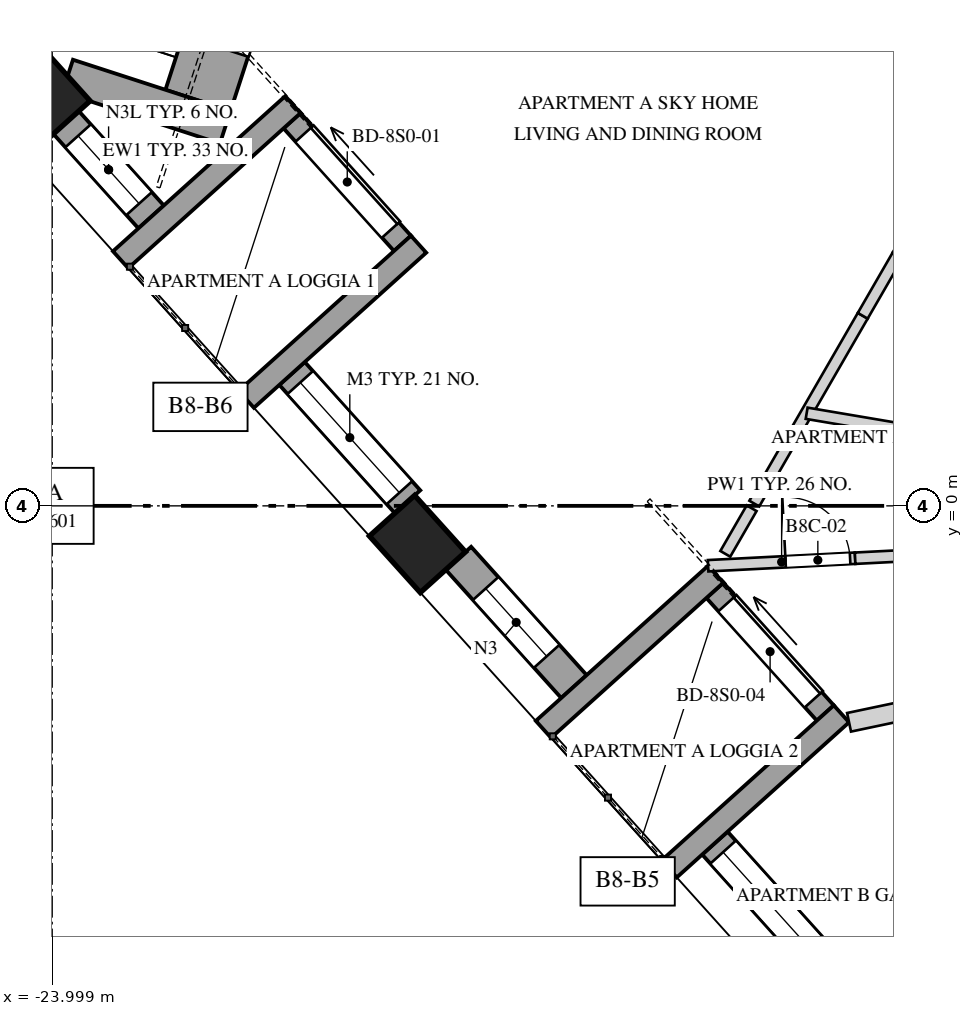
"""IFC4 building model, lengths in metres.
Left out: names, types, materials, properties, quantities, classifications, styles, units other than length and angle.
Written with IfcOpenShell. Run it as: python <this file> out.ifc"""

import sys

from ifc_helpers import new_model, si_unit, direction, frame, frame_2d, origin, origin_2d, place, context, subcontext, project, spatial, rectangle, extrude, element, fill, save


model = new_model("IFC4")
c1 = context("Model", 3, precision=1e-05, world=origin(), true_north=direction((0.0, 1.0)))
c2 = subcontext(c1, "Body", "Model", "MODEL_VIEW")
j1 = project(units=[si_unit("LENGTHUNIT", "METRE"), si_unit("PLANEANGLEUNIT", "RADIAN")], contexts=[c1])
p1 = place(None, origin())
s1 = spatial("IfcSite", under=j1, at=p1, CompositionType="ELEMENT")
p2 = place(p1, origin())
s2 = spatial("IfcBuilding", under=s1, at=p2, CompositionType="ELEMENT")
p3 = place(p2, frame((0.0, 0.0, 344.4)))
s3 = spatial("IfcBuildingStorey", under=s2, at=p3, CompositionType="ELEMENT", Elevation=344.4)
p4 = place(p3, frame((-24.278, 5.368, 0.0), z_axis=(0.0, 0.0, 1.0), x_axis=(0.669130606359, -0.743144825477, 0.0)))
e1 = element("IfcColumn", 1, at=p4, inside=s3, PredefinedType="COLUMN", context=c2, shape_type="SweptSolid", body=[
    extrude(rectangle(XDim=1.1, YDim=1.1, at=origin_2d()), origin(), (0.0, 0.0, 1.0), 4.0),
])
p5 = place(p3, frame((-19.195, -0.502, 0.0), z_axis=(0.0, 0.0, 1.0), x_axis=(0.669130606359, -0.743144825477, 0.0)))
e2 = element("IfcColumn", 2, at=p5, inside=s3, PredefinedType="COLUMN", context=c2, shape_type="SweptSolid", body=[
    extrude(rectangle(XDim=1.0, YDim=0.8, at=origin_2d()), origin(), (0.0, 0.0, 1.0), 4.0),
])
p6 = place(p3, frame((-23.817, 5.043, 0.0), z_axis=(0.0, 0.0, 1.0), x_axis=(0.669182609054, -0.743097998746, 0.0)))
e3 = element("IfcWall", 3, at=p6, inside=s3, PredefinedType="SOLIDWALL", context=c2, shape_type="SweptSolid", body=[
    extrude(rectangle(XDim=1.671, YDim=0.45, at=frame_2d((0.836, 0.0))), origin(), (0.0, 0.0, 1.0), 3.3),
])
p7 = place(p6, frame((0.236, 0.0, 0.4)))
e4 = element("IfcOpeningElement", 4, at=p7, cuts=e3, PredefinedType="OPENING", context=c2, shape_type="SweptSolid", body=[
    extrude(rectangle(XDim=1.2, YDim=2.1, at=frame_2d((0.6, 1.05))), frame((0.0, 0.235, 0.0), z_axis=(0.0, -1.0, 0.0), x_axis=(1.0, 0.0, 0.0)), (0.0, 0.0, 1.0), 0.47),
])
p8 = place(p3, frame((-20.844, 1.742, 0.0), z_axis=(0.0, 0.0, 1.0), x_axis=(0.669160694992, -0.743117732447, 0.0)))
e5 = element("IfcWall", 5, at=p8, inside=s3, PredefinedType="SOLIDWALL", context=c2, shape_type="SweptSolid", body=[
    extrude(rectangle(XDim=2.271, YDim=0.45, at=frame_2d((1.136, 0.0))), origin(), (0.0, 0.0, 1.0), 3.3),
])
p9 = place(p8, frame((0.161, 0.0, 0.4)))
e6 = element("IfcOpeningElement", 6, at=p9, cuts=e5, PredefinedType="OPENING", context=c2, shape_type="SweptSolid", body=[
    extrude(rectangle(XDim=1.95, YDim=2.75, at=frame_2d((0.975, 1.375))), frame((0.0, 0.235, 0.0), z_axis=(0.0, -1.0, 0.0), x_axis=(1.0, 0.0, 0.0)), (0.0, 0.0, 1.0), 0.47),
])
p10 = place(p3, frame((-18.656, -0.689, 0.0), z_axis=(0.0, 0.0, 1.0), x_axis=(0.669107243666, -0.743165860676, 0.0)))
e7 = element("IfcWall", 7, at=p10, inside=s3, PredefinedType="SOLIDWALL", context=c2, shape_type="SweptSolid", body=[
    extrude(rectangle(XDim=2.271, YDim=0.45, at=frame_2d((1.136, 0.0))), origin(), (0.0, 0.0, 1.0), 3.3),
])
p11 = place(p10, frame((0.536, 0.0, 0.4)))
e8 = element("IfcOpeningElement", 8, at=p11, cuts=e7, PredefinedType="OPENING", context=c2, shape_type="SweptSolid", body=[
    extrude(rectangle(XDim=1.2, YDim=2.75, at=frame_2d((0.6, 1.375))), frame((0.0, 0.235, 0.0), z_axis=(0.0, -1.0, 0.0), x_axis=(1.0, 0.0, 0.0)), (0.0, 0.0, 1.0), 0.47),
])
p12 = place(p3, frame((-15.281, -4.437, 0.0), z_axis=(0.0, 0.0, 1.0), x_axis=(0.669107243666, -0.743165860676, 0.0)))
e9 = element("IfcWall", 9, at=p12, inside=s3, PredefinedType="SOLIDWALL", context=c2, shape_type="SweptSolid", body=[
    extrude(rectangle(XDim=2.271, YDim=0.45, at=frame_2d((1.136, 0.0))), origin(), (0.0, 0.0, 1.0), 3.3),
])
p13 = place(p12, frame((0.161, 0.0, 0.4)))
e10 = element("IfcOpeningElement", 10, at=p13, cuts=e9, PredefinedType="OPENING", context=c2, shape_type="SweptSolid", body=[
    extrude(rectangle(XDim=1.95, YDim=2.75, at=frame_2d((0.975, 1.375))), frame((0.0, 0.235, 0.0), z_axis=(0.0, -1.0, 0.0), x_axis=(1.0, 0.0, 0.0)), (0.0, 0.0, 1.0), 0.47),
])
p14 = place(p3, frame((-20.844, 5.067, 0.0), z_axis=(0.0, 0.0, 1.0), x_axis=(0.669144868344, -0.743131983681, 0.0)))
e11 = element("IfcWall", 11, at=p14, inside=s3, PredefinedType="SOLIDWALL", context=c2, shape_type="SweptSolid", body=[
    extrude(rectangle(XDim=2.171, YDim=0.3, at=frame_2d((1.085, 0.0))), origin(), (0.0, 0.0, 1.0), 3.3),
])
p15 = place(p14, frame((0.236, 0.0, 0.0)))
e12 = element("IfcOpeningElement", 12, at=p15, cuts=e11, PredefinedType="OPENING", context=c2, shape_type="SweptSolid", body=[
    extrude(rectangle(XDim=1.7, YDim=2.5, at=frame_2d((0.85, 1.25))), frame((0.0, 0.16, 0.0), z_axis=(0.0, -1.0, 0.0), x_axis=(1.0, 0.0, 0.0)), (0.0, 0.0, 1.0), 0.32),
])
for number, where, z_axis, x_axis in (
    (13, (-23.1, 3.238, 0.0), (0.0, 0.0, 1.0), (0.743, 0.669, 0.0)),
    (14, (-21.447, 1.402, 0.0), (0.0, 0.0, 1.0), (0.743, 0.669, 0.0)),
):
    element("IfcWall", number, at=place(p3, frame(where, z_axis=z_axis, x_axis=x_axis)), inside=s3, PredefinedType="SOLIDWALL", context=c2, shape_type="SweptSolid", body=[
        extrude(rectangle(XDim=3.05, YDim=0.3, at=frame_2d((1.525, 0.0))), origin(), (0.0, 0.0, 1.0), 3.3),
    ])
p16 = place(p3, frame((-15.281, -1.111, 0.0), z_axis=(0.0, 0.0, 1.0), x_axis=(0.669144868344, -0.743131983681, 0.0)))
e15 = element("IfcWall", 15, at=p16, inside=s3, PredefinedType="SOLIDWALL", context=c2, shape_type="SweptSolid", body=[
    extrude(rectangle(XDim=2.171, YDim=0.3, at=frame_2d((1.085, 0.0))), origin(), (0.0, 0.0, 1.0), 3.3),
])
p17 = place(p16, frame((0.236, 0.0, 0.0)))
e16 = element("IfcOpeningElement", 16, at=p17, cuts=e15, PredefinedType="OPENING", context=c2, shape_type="SweptSolid", body=[
    extrude(rectangle(XDim=1.7, YDim=2.5, at=frame_2d((0.85, 1.25))), frame((0.0, 0.16, 0.0), z_axis=(0.0, -1.0, 0.0), x_axis=(1.0, 0.0, 0.0)), (0.0, 0.0, 1.0), 0.32),
])
p18 = place(p3, frame((-17.537, -2.94, 0.0), z_axis=(0.0, 0.0, 1.0), x_axis=(0.743118999127, 0.669159288314, 0.0)))
e17 = element("IfcWall", 17, at=p18, inside=s3, PredefinedType="SOLIDWALL", context=c2, shape_type="SweptSolid", body=[
    extrude(rectangle(XDim=3.05, YDim=0.3, at=frame_2d((1.525, 0.0))), origin(), (0.0, 0.0, 1.0), 3.3),
])
p19 = place(p3, frame((-15.883, -4.777, 0.0), z_axis=(0.0, 0.0, 1.0), x_axis=(0.743122960955, 0.669154888573, 0.0)))
e18 = element("IfcWall", 18, at=p19, inside=s3, PredefinedType="SOLIDWALL", context=c2, shape_type="SweptSolid", body=[
    extrude(rectangle(XDim=3.05, YDim=0.3, at=frame_2d((1.525, 0.0))), origin(), (0.0, 0.0, 1.0), 3.3),
])
p20 = place(p3, frame((-22.082, 5.335, 0.0), z_axis=(0.0, 0.0, 1.0), x_axis=(0.309019824916, 0.951055596592, 0.0)))
e19 = element("IfcWall", 19, at=p20, inside=s3, PredefinedType="SOLIDWALL", context=c2, shape_type="SweptSolid", body=[
    extrude(rectangle(XDim=3.5, YDim=0.9, at=frame_2d((1.75, 0.0))), origin(), (0.0, 0.0, 1.0), 3.3),
])
p21 = place(p20, frame((0.75, 0.0, 0.0)))
e20 = element("IfcOpeningElement", 20, at=p21, cuts=e19, PredefinedType="OPENING", context=c2, shape_type="SweptSolid", body=[
    extrude(rectangle(XDim=2.0, YDim=2.4, at=frame_2d((1.0, 1.2))), frame((0.0, 0.46, 0.0), z_axis=(0.0, -1.0, 0.0), x_axis=(1.0, 0.0, 0.0)), (0.0, 0.0, 1.0), 0.92),
])
p22 = place(p3, frame((-23.796, 5.655, 0.0), z_axis=(0.0, 0.0, 1.0), x_axis=(0.951064526973, -0.308992338955, 0.0)))
e21 = element("IfcWall", 21, at=p22, inside=s3, PredefinedType="SOLIDWALL", context=c2, shape_type="SweptSolid", body=[
    extrude(rectangle(XDim=2.179, YDim=0.45, at=frame_2d((1.09, 0.0))), origin(), (0.0, 0.0, 1.0), 2.55),
])
p23 = place(p3, frame((-15.371, -0.788, 0.0), z_axis=(0.0, 0.0, 1.0), x_axis=(0.998683196323, 0.051301787316, 0.0)))
e22 = element("IfcWall", 22, at=p23, inside=s3, PredefinedType="PARTITIONING", context=c2, shape_type="SweptSolid", body=[
    extrude(rectangle(XDim=1.937, YDim=0.15, at=frame_2d((0.968, 0.0))), origin(), (0.0, 0.0, 1.0), 3.65),
])
p24 = place(p23, frame((1.021, 0.0, 0.0)))
e23 = element("IfcOpeningElement", 23, at=p24, cuts=e22, PredefinedType="OPENING", context=c2, shape_type="SweptSolid", body=[
    extrude(rectangle(XDim=0.85, YDim=2.4, at=frame_2d((0.425, 1.2))), frame((0.0, 0.085, 0.0), z_axis=(0.0, -1.0, 0.0), x_axis=(1.0, 0.0, 0.0)), (0.0, 0.0, 1.0), 0.17),
])
p25 = place(p3, frame((-13.437, -0.689, 0.0), z_axis=(0.0, 0.0, 1.0), x_axis=(0.99869287416, 0.05111304238, 0.0)))
e24 = element("IfcWall", 24, at=p25, inside=s3, PredefinedType="PARTITIONING", context=c2, shape_type="SweptSolid", body=[
    extrude(rectangle(XDim=1.657, YDim=0.15, at=frame_2d((0.829, 0.0))), origin(), (0.0, 0.0, 1.0), 2.95),
])
p26 = place(p3, frame((-15.145, -0.631, 0.0), z_axis=(0.0, 0.0, 1.0), x_axis=(0.499966449638, 0.866044773228, 0.0)))
e25 = element("IfcWall", 25, at=p26, inside=s3, PredefinedType="PARTITIONING", context=c2, shape_type="SweptSolid", body=[
    extrude(rectangle(XDim=0.693, YDim=0.15, at=frame_2d((0.346, 0.0))), origin(), (0.0, 0.0, 1.0), 2.95),
])
p27 = place(p3, frame((-14.763, 0.03, 0.0), z_axis=(0.0, 0.0, 1.0), x_axis=(0.500003887042, 0.866023159588, 0.0)))
e26 = element("IfcWall", 26, at=p27, inside=s3, PredefinedType="PARTITIONING", context=c2, shape_type="SweptSolid", body=[
    extrude(rectangle(XDim=2.854, YDim=0.15, at=frame_2d((1.427, 0.0))), origin(), (0.0, 0.0, 1.0), 3.65),
])
p28 = place(p3, frame((-13.336, 2.501, 0.0), z_axis=(0.0, 0.0, 1.0), x_axis=(0.500144624036, 0.865941888956, 0.0)))
e27 = element("IfcWall", 27, at=p28, inside=s3, PredefinedType="PARTITIONING", context=c2, shape_type="SweptSolid", body=[
    extrude(rectangle(XDim=0.918, YDim=0.15, at=frame_2d((0.459, 0.0))), origin(), (0.0, 0.0, 1.0), 2.55),
])
p29 = place(p3, frame((-12.877, 3.295, 0.0), z_axis=(0.0, 0.0, 1.0), x_axis=(0.499876388284, 0.86609675928, 0.0)))
e28 = element("IfcWall", 28, at=p29, inside=s3, PredefinedType="PARTITIONING", context=c2, shape_type="SweptSolid", body=[
    extrude(rectangle(XDim=1.693, YDim=0.15, at=frame_2d((0.847, 0.0))), origin(), (0.0, 0.0, 1.0), 3.65),
])
p30 = place(p3, frame((-11.371, -2.396, 0.0), z_axis=(0.0, 0.0, 1.0), x_axis=(-0.978520233105, -0.206150802581, 0.0)))
e29 = element("IfcWall", 29, at=p30, inside=s3, PredefinedType="SOLIDWALL", context=c2, shape_type="SweptSolid", body=[
    extrude(rectangle(XDim=2.192, YDim=0.25, at=frame_2d((1.096, 0.0))), origin(), (0.0, 0.0, 1.0), 3.65),
])
p31 = place(p3, frame((-11.028, 0.703, 0.0), z_axis=(0.0, 0.0, 1.0), x_axis=(-0.985959074205, 0.166987137207, 0.0)))
e30 = element("IfcWall", 30, at=p31, inside=s3, PredefinedType="PARTITIONING", context=c2, shape_type="SweptSolid", body=[
    extrude(rectangle(XDim=3.089, YDim=0.15, at=frame_2d((1.545, 0.0))), origin(), (0.0, 0.0, 1.0), 3.65),
])
p32 = place(p7, origin())
e31 = element("IfcWindow", 31, at=p32, inside=s3, PartitioningType="SINGLE_PANEL", PredefinedType="WINDOW", context=c2, shape_type="SweptSolid", body=[
    extrude(rectangle(XDim=1.2, YDim=2.1, at=frame_2d((0.6, 1.05))), frame((0.0, 0.03, 0.0), z_axis=(0.0, -1.0, 0.0), x_axis=(1.0, 0.0, 0.0)), (0.0, 0.0, 1.0), 0.06),
])
fill(e4, e31)
p33 = place(p9, origin())
e32 = element("IfcWindow", 32, at=p33, inside=s3, PartitioningType="SINGLE_PANEL", PredefinedType="WINDOW", context=c2, shape_type="SweptSolid", body=[
    extrude(rectangle(XDim=1.95, YDim=2.75, at=frame_2d((0.975, 1.375))), frame((0.0, 0.03, 0.0), z_axis=(0.0, -1.0, 0.0), x_axis=(1.0, 0.0, 0.0)), (0.0, 0.0, 1.0), 0.06),
])
fill(e6, e32)
p34 = place(p11, origin())
e33 = element("IfcWindow", 33, at=p34, inside=s3, PartitioningType="SINGLE_PANEL", PredefinedType="WINDOW", context=c2, shape_type="SweptSolid", body=[
    extrude(rectangle(XDim=1.2, YDim=2.75, at=frame_2d((0.6, 1.375))), frame((0.0, 0.03, 0.0), z_axis=(0.0, -1.0, 0.0), x_axis=(1.0, 0.0, 0.0)), (0.0, 0.0, 1.0), 0.06),
])
fill(e8, e33)
p35 = place(p13, origin())
e34 = element("IfcWindow", 34, at=p35, inside=s3, PartitioningType="SINGLE_PANEL", PredefinedType="WINDOW", context=c2, shape_type="SweptSolid", body=[
    extrude(rectangle(XDim=1.95, YDim=2.75, at=frame_2d((0.975, 1.375))), frame((0.0, 0.03, 0.0), z_axis=(0.0, -1.0, 0.0), x_axis=(1.0, 0.0, 0.0)), (0.0, 0.0, 1.0), 0.06),
])
fill(e10, e34)
p36 = place(p15, origin())
e35 = element("IfcDoor", 35, at=p36, inside=s3, OperationType="SLIDING_TO_LEFT", PredefinedType="DOOR", context=c2, shape_type="SweptSolid", body=[
    extrude(rectangle(XDim=1.7, YDim=2.5, at=frame_2d((0.85, 1.25))), frame((0.0, 0.025, 0.0), z_axis=(0.0, -1.0, 0.0), x_axis=(1.0, 0.0, 0.0)), (0.0, 0.0, 1.0), 0.05),
])
fill(e12, e35)
p37 = place(p17, origin())
e36 = element("IfcDoor", 36, at=p37, inside=s3, OperationType="SLIDING_TO_LEFT", PredefinedType="DOOR", context=c2, shape_type="SweptSolid", body=[
    extrude(rectangle(XDim=1.7, YDim=2.5, at=frame_2d((0.85, 1.25))), frame((0.0, 0.025, 0.0), z_axis=(0.0, -1.0, 0.0), x_axis=(1.0, 0.0, 0.0)), (0.0, 0.0, 1.0), 0.05),
])
fill(e16, e36)
p38 = place(p24, origin())
e37 = element("IfcDoor", 37, at=p38, inside=s3, OperationType="SINGLE_SWING_RIGHT", PredefinedType="DOOR", context=c2, shape_type="SweptSolid", body=[
    extrude(rectangle(XDim=0.85, YDim=2.4, at=frame_2d((0.425, 1.2))), frame((0.0, 0.025, 0.0), z_axis=(0.0, -1.0, 0.0), x_axis=(1.0, 0.0, 0.0)), (0.0, 0.0, 1.0), 0.05),
])
fill(e23, e37)
save(model, sys.argv[1])
